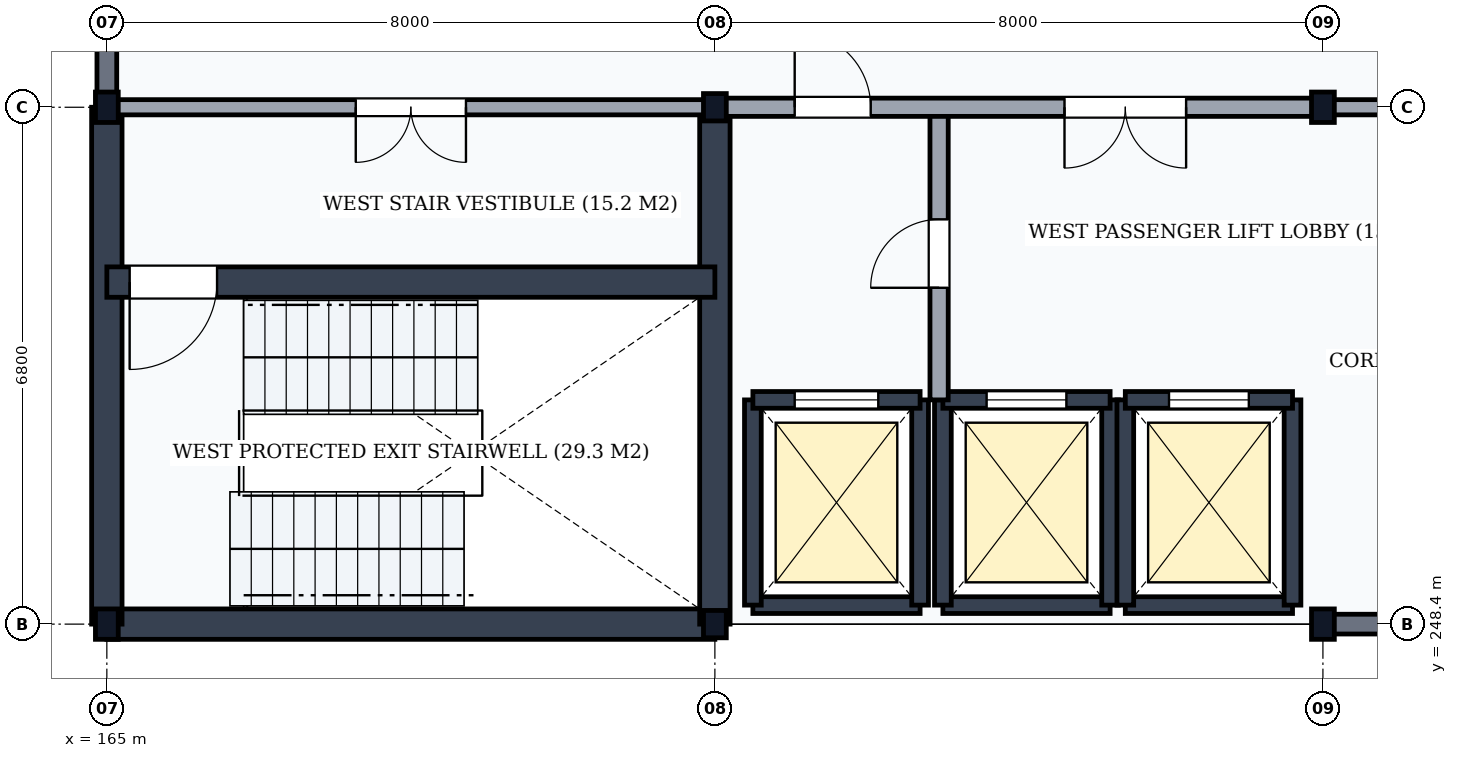
"""IFC4 building model, lengths in metres.
Left out: names, types, materials, properties, quantities, classifications, styles, units other than length and angle.
Written with IfcOpenShell. Run it as: python <this file> out.ifc"""

import sys

from ifc_helpers import new_model, si_unit, direction, frame, frame_2d, origin, origin_2d, place, context, subcontext, project, spatial, rectangle, i_section, extrude, element, fill, save


model = new_model("IFC4")
c1 = context("Model", 3, precision=1e-05, world=origin(), true_north=direction((0.0, 1.0)))
c2 = subcontext(c1, "Body", "Model", "MODEL_VIEW")
j1 = project(units=[si_unit("LENGTHUNIT", "METRE"), si_unit("PLANEANGLEUNIT", "RADIAN")], contexts=[c1])
p1 = place(None, origin())
s1 = spatial("IfcSite", under=j1, at=p1, CompositionType="ELEMENT")
p2 = place(p1, origin())
s2 = spatial("IfcBuilding", under=s1, at=p2, CompositionType="ELEMENT")
p3 = place(p2, frame((0.0, 0.0, 63.9)))
s3 = spatial("IfcBuildingStorey", under=s2, at=p3, CompositionType="ELEMENT", Elevation=63.9)
for number, where, z_axis, x_axis in (
    (1, (165.0, 248.4, 0.0), (0.0, 0.0, 1.0), (1.0, 0.0, 0.0)),
    (2, (165.0, 255.2, 0.0), (0.0, 0.0, 1.0), (1.0, 0.0, 0.0)),
):
    element("IfcColumn", number, at=place(p3, frame(where, z_axis=z_axis, x_axis=x_axis)), inside=s3, PredefinedType="COLUMN", context=c2, shape_type="SweptSolid", body=[
        extrude(i_section(OverallWidth=0.3, OverallDepth=0.4, WebThickness=0.013, FlangeThickness=0.024, FilletRadius=0.027, at=origin_2d()), origin(), (0.0, 0.0, 1.0), 3.9),
    ])
for number, where, z_axis, x_axis in (
    (3, (173.0, 248.4, 0.0), (0.0, 0.0, 1.0), (1.0, 0.0, 0.0)),
    (4, (173.0, 255.2, 0.0), (0.0, 0.0, 1.0), (1.0, 0.0, 0.0)),
):
    element("IfcColumn", number, at=place(p3, frame(where, z_axis=z_axis, x_axis=x_axis)), inside=s3, PredefinedType="COLUMN", context=c2, shape_type="SweptSolid", body=[
        extrude(i_section(OverallWidth=0.3, OverallDepth=0.36, WebThickness=0.012, FlangeThickness=0.022, FilletRadius=0.027, at=origin_2d()), origin(), (0.0, 0.0, 1.0), 3.9),
    ])
for number, where, z_axis, x_axis in (
    (5, (181.0, 248.4, 0.0), (0.0, 0.0, 1.0), (1.0, 0.0, 0.0)),
    (6, (181.0, 255.2, 0.0), (0.0, 0.0, 1.0), (1.0, 0.0, 0.0)),
):
    element("IfcColumn", number, at=place(p3, frame(where, z_axis=z_axis, x_axis=x_axis)), inside=s3, PredefinedType="COLUMN", context=c2, shape_type="SweptSolid", body=[
        extrude(i_section(OverallWidth=0.3, OverallDepth=0.4, WebThickness=0.013, FlangeThickness=0.024, FilletRadius=0.027, at=origin_2d()), origin(), (0.0, 0.0, 1.0), 3.9),
    ])
p4 = place(p3, frame((181.006, 248.4, 0.0), z_axis=(0.0, 0.0, 1.0), x_axis=(1.0, 0.0, 0.0)))
e7 = element("IfcWall", 7, at=p4, inside=s3, PredefinedType="SOLIDWALL", context=c2, shape_type="SweptSolid", body=[
    extrude(rectangle(XDim=7.988, YDim=0.26, at=frame_2d((3.994, 0.0))), origin(), (0.0, 0.0, 1.0), 3.388),
])
p5 = place(p4, frame((3.244, 0.0, 0.95)))
e8 = element("IfcOpeningElement", 8, at=p5, cuts=e7, PredefinedType="OPENING", context=c2, shape_type="SweptSolid", body=[
    extrude(rectangle(XDim=0.9, YDim=2.2, at=frame_2d((0.45, 1.1))), frame((0.0, 0.145, 0.0), z_axis=(0.0, -1.0, 0.0), x_axis=(1.0, 0.0, 0.0)), (0.0, 0.0, 1.0), 0.29),
])
p6 = place(p3, frame((165.0, 255.206, 0.0), z_axis=(0.0, 0.0, 1.0), x_axis=(0.0, 1.0, 0.0)))
e9 = element("IfcWall", 9, at=p6, inside=s3, PredefinedType="SOLIDWALL", context=c2, shape_type="SweptSolid", body=[
    extrude(rectangle(XDim=7.588, YDim=0.26, at=frame_2d((3.794, 0.0))), origin(), (0.0, 0.0, 1.0), 3.428),
])
p7 = place(p3, frame((165.0, 248.4, 0.0), z_axis=(0.0, 0.0, 1.0), x_axis=(1.0, 0.0, 0.0)))
e10 = element("IfcWall", 10, at=p7, inside=s3, PredefinedType="SHEAR", context=c2, shape_type="SweptSolid", body=[
    extrude(rectangle(XDim=8.0, YDim=0.4, at=frame_2d((4.0, 0.0))), origin(), (0.0, 0.0, 1.0), 3.7),
])
for number, where, z_axis, x_axis in (
    (11, (165.0, 248.4, 0.0), (0.0, 0.0, 1.0), (0.0, 1.0, 0.0)),
    (12, (173.0, 248.4, 0.0), (0.0, 0.0, 1.0), (0.0, 1.0, 0.0)),
):
    element("IfcWall", number, at=place(p3, frame(where, z_axis=z_axis, x_axis=x_axis)), inside=s3, PredefinedType="SHEAR", context=c2, shape_type="SweptSolid", body=[
        extrude(rectangle(XDim=6.8, YDim=0.4, at=frame_2d((3.4, 0.0))), origin(), (0.0, 0.0, 1.0), 3.7),
    ])
p8 = place(p3, frame((165.0, 252.9, 0.0), z_axis=(0.0, 0.0, 1.0), x_axis=(1.0, 0.0, 0.0)))
e13 = element("IfcWall", 13, at=p8, inside=s3, PredefinedType="SHEAR", context=c2, shape_type="SweptSolid", body=[
    extrude(rectangle(XDim=8.0, YDim=0.4, at=frame_2d((4.0, 0.0))), origin(), (0.0, 0.0, 1.0), 3.7),
])
p9 = place(p8, frame((0.3, 0.0, 0.0)))
e14 = element("IfcOpeningElement", 14, at=p9, cuts=e13, PredefinedType="OPENING", context=c2, shape_type="SweptSolid", body=[
    extrude(rectangle(XDim=1.15, YDim=2.15, at=frame_2d((0.575, 1.075))), frame((0.0, 0.215, 0.0), z_axis=(0.0, -1.0, 0.0), x_axis=(1.0, 0.0, 0.0)), (0.0, 0.0, 1.0), 0.43),
])
p10 = place(p3, frame((165.0, 255.2, 0.0), z_axis=(0.0, 0.0, 1.0), x_axis=(1.0, 0.0, 0.0)))
e15 = element("IfcWall", 15, at=p10, inside=s3, PredefinedType="PARTITIONING", context=c2, shape_type="SweptSolid", body=[
    extrude(rectangle(XDim=8.0, YDim=0.2, at=frame_2d((4.0, 0.0))), origin(), (0.0, 0.0, 1.0), 3.148),
])
p11 = place(p10, frame((3.275, 0.0, 0.0)))
e16 = element("IfcOpeningElement", 16, at=p11, cuts=e15, PredefinedType="OPENING", context=c2, shape_type="SweptSolid", body=[
    extrude(rectangle(XDim=1.45, YDim=2.2, at=frame_2d((0.725, 1.1))), frame((0.0, 0.115, 0.0), z_axis=(0.0, -1.0, 0.0), x_axis=(1.0, 0.0, 0.0)), (0.0, 0.0, 1.0), 0.23),
])
p12 = place(p3, frame((173.5, 248.65, 0.0), z_axis=(0.0, 0.0, 1.0), x_axis=(1.0, 0.0, 0.0)))
e17 = element("IfcWall", 17, at=p12, inside=s3, PredefinedType="SHEAR", context=c2, shape_type="SweptSolid", body=[
    extrude(rectangle(XDim=2.2, YDim=0.22, at=frame_2d((1.1, 0.0))), origin(), (0.0, 0.0, 1.0), 3.7),
])
for number, where, z_axis, x_axis in (
    (18, (173.5, 248.65, 0.0), (0.0, 0.0, 1.0), (0.0, 1.0, 0.0)),
    (19, (175.7, 248.65, 0.0), (0.0, 0.0, 1.0), (0.0, 1.0, 0.0)),
):
    element("IfcWall", number, at=place(p3, frame(where, z_axis=z_axis, x_axis=x_axis)), inside=s3, PredefinedType="SHEAR", context=c2, shape_type="SweptSolid", body=[
        extrude(rectangle(XDim=2.7, YDim=0.22, at=frame_2d((1.35, 0.0))), origin(), (0.0, 0.0, 1.0), 3.7),
    ])
p13 = place(p3, frame((173.5, 251.35, 0.0), z_axis=(0.0, 0.0, 1.0), x_axis=(1.0, 0.0, 0.0)))
e20 = element("IfcWall", 20, at=p13, inside=s3, PredefinedType="SHEAR", context=c2, shape_type="SweptSolid", body=[
    extrude(rectangle(XDim=2.2, YDim=0.22, at=frame_2d((1.1, 0.0))), origin(), (0.0, 0.0, 1.0), 3.7),
])
p14 = place(p13, frame((0.55, 0.0, 0.0)))
e21 = element("IfcOpeningElement", 21, at=p14, cuts=e20, PredefinedType="OPENING", context=c2, shape_type="SweptSolid", body=[
    extrude(rectangle(XDim=1.1, YDim=2.15, at=frame_2d((0.55, 1.075))), frame((0.0, 0.125, 0.0), z_axis=(0.0, -1.0, 0.0), x_axis=(1.0, 0.0, 0.0)), (0.0, 0.0, 1.0), 0.25),
])
p15 = place(p3, frame((176.0, 248.65, 0.0), z_axis=(0.0, 0.0, 1.0), x_axis=(1.0, 0.0, 0.0)))
e22 = element("IfcWall", 22, at=p15, inside=s3, PredefinedType="SHEAR", context=c2, shape_type="SweptSolid", body=[
    extrude(rectangle(XDim=2.2, YDim=0.22, at=frame_2d((1.1, 0.0))), origin(), (0.0, 0.0, 1.0), 3.7),
])
for number, where, z_axis, x_axis in (
    (23, (176.0, 248.65, 0.0), (0.0, 0.0, 1.0), (0.0, 1.0, 0.0)),
    (24, (178.2, 248.65, 0.0), (0.0, 0.0, 1.0), (0.0, 1.0, 0.0)),
):
    element("IfcWall", number, at=place(p3, frame(where, z_axis=z_axis, x_axis=x_axis)), inside=s3, PredefinedType="SHEAR", context=c2, shape_type="SweptSolid", body=[
        extrude(rectangle(XDim=2.7, YDim=0.22, at=frame_2d((1.35, 0.0))), origin(), (0.0, 0.0, 1.0), 3.7),
    ])
p16 = place(p3, frame((176.0, 251.35, 0.0), z_axis=(0.0, 0.0, 1.0), x_axis=(1.0, 0.0, 0.0)))
e25 = element("IfcWall", 25, at=p16, inside=s3, PredefinedType="SHEAR", context=c2, shape_type="SweptSolid", body=[
    extrude(rectangle(XDim=2.2, YDim=0.22, at=frame_2d((1.1, 0.0))), origin(), (0.0, 0.0, 1.0), 3.7),
])
p17 = place(p16, frame((0.575, 0.0, 0.0)))
e26 = element("IfcOpeningElement", 26, at=p17, cuts=e25, PredefinedType="OPENING", context=c2, shape_type="SweptSolid", body=[
    extrude(rectangle(XDim=1.05, YDim=2.15, at=frame_2d((0.525, 1.075))), frame((0.0, 0.125, 0.0), z_axis=(0.0, -1.0, 0.0), x_axis=(1.0, 0.0, 0.0)), (0.0, 0.0, 1.0), 0.25),
])
p18 = place(p3, frame((178.4, 248.65, 0.0), z_axis=(0.0, 0.0, 1.0), x_axis=(1.0, 0.0, 0.0)))
e27 = element("IfcWall", 27, at=p18, inside=s3, PredefinedType="SHEAR", context=c2, shape_type="SweptSolid", body=[
    extrude(rectangle(XDim=2.2, YDim=0.22, at=frame_2d((1.1, 0.0))), origin(), (0.0, 0.0, 1.0), 3.7),
])
for number, where, z_axis, x_axis in (
    (28, (178.4, 248.65, 0.0), (0.0, 0.0, 1.0), (0.0, 1.0, 0.0)),
    (29, (180.6, 248.65, 0.0), (0.0, 0.0, 1.0), (0.0, 1.0, 0.0)),
):
    element("IfcWall", number, at=place(p3, frame(where, z_axis=z_axis, x_axis=x_axis)), inside=s3, PredefinedType="SHEAR", context=c2, shape_type="SweptSolid", body=[
        extrude(rectangle(XDim=2.7, YDim=0.22, at=frame_2d((1.35, 0.0))), origin(), (0.0, 0.0, 1.0), 3.7),
    ])
p19 = place(p3, frame((178.4, 251.35, 0.0), z_axis=(0.0, 0.0, 1.0), x_axis=(1.0, 0.0, 0.0)))
e30 = element("IfcWall", 30, at=p19, inside=s3, PredefinedType="SHEAR", context=c2, shape_type="SweptSolid", body=[
    extrude(rectangle(XDim=2.2, YDim=0.22, at=frame_2d((1.1, 0.0))), origin(), (0.0, 0.0, 1.0), 3.7),
])
p20 = place(p19, frame((0.575, 0.0, 0.0)))
e31 = element("IfcOpeningElement", 31, at=p20, cuts=e30, PredefinedType="OPENING", context=c2, shape_type="SweptSolid", body=[
    extrude(rectangle(XDim=1.05, YDim=2.15, at=frame_2d((0.525, 1.075))), frame((0.0, 0.125, 0.0), z_axis=(0.0, -1.0, 0.0), x_axis=(1.0, 0.0, 0.0)), (0.0, 0.0, 1.0), 0.25),
])
p21 = place(p3, frame((175.95, 251.35, 0.0), z_axis=(0.0, 0.0, 1.0), x_axis=(0.0, 1.0, 0.0)))
e32 = element("IfcWall", 32, at=p21, inside=s3, PredefinedType="PARTITIONING", context=c2, shape_type="SweptSolid", body=[
    extrude(rectangle(XDim=3.85, YDim=0.24, at=frame_2d((1.925, 0.0))), origin(), (0.0, 0.0, 1.0), 3.7),
])
p22 = place(p21, frame((1.475, 0.0, 0.0)))
e33 = element("IfcOpeningElement", 33, at=p22, cuts=e32, PredefinedType="OPENING", context=c2, shape_type="SweptSolid", body=[
    extrude(rectangle(XDim=0.9, YDim=2.1, at=frame_2d((0.45, 1.05))), frame((0.0, 0.135, 0.0), z_axis=(0.0, -1.0, 0.0), x_axis=(1.0, 0.0, 0.0)), (0.0, 0.0, 1.0), 0.27),
])
p23 = place(p3, frame((173.0, 255.2, 0.0), z_axis=(0.0, 0.0, 1.0), x_axis=(1.0, 0.0, 0.0)))
e34 = element("IfcWall", 34, at=p23, inside=s3, PredefinedType="PARTITIONING", context=c2, shape_type="SweptSolid", body=[
    extrude(rectangle(XDim=8.0, YDim=0.24, at=frame_2d((4.0, 0.0))), origin(), (0.0, 0.0, 1.0), 3.148),
])
p24 = place(p23, frame((1.05, 0.0, 0.0)))
e35 = element("IfcOpeningElement", 35, at=p24, cuts=e34, PredefinedType="OPENING", context=c2, shape_type="SweptSolid", body=[
    extrude(rectangle(XDim=1.0, YDim=2.1, at=frame_2d((0.5, 1.05))), frame((0.0, 0.135, 0.0), z_axis=(0.0, -1.0, 0.0), x_axis=(1.0, 0.0, 0.0)), (0.0, 0.0, 1.0), 0.27),
])
p25 = place(p23, frame((4.6, 0.0, 0.0)))
e36 = element("IfcOpeningElement", 36, at=p25, cuts=e34, PredefinedType="OPENING", context=c2, shape_type="SweptSolid", body=[
    extrude(rectangle(XDim=1.6, YDim=2.25, at=frame_2d((0.8, 1.125))), frame((0.0, 0.135, 0.0), z_axis=(0.0, -1.0, 0.0), x_axis=(1.0, 0.0, 0.0)), (0.0, 0.0, 1.0), 0.27),
])
p26 = place(p3, frame((181.0, 255.2, 0.0), z_axis=(0.0, 0.0, 1.0), x_axis=(1.0, 0.0, 0.0)))
e37 = element("IfcWall", 37, at=p26, inside=s3, PredefinedType="PARTITIONING", context=c2, shape_type="SweptSolid", body=[
    extrude(rectangle(XDim=8.0, YDim=0.2, at=frame_2d((4.0, 0.0))), origin(), (0.0, 0.0, 1.0), 3.148),
])
p27 = place(p26, frame((0.85, 0.0, 0.0)))
e38 = element("IfcOpeningElement", 38, at=p27, cuts=e37, PredefinedType="OPENING", context=c2, shape_type="SweptSolid", body=[
    extrude(rectangle(XDim=0.9, YDim=2.1, at=frame_2d((0.45, 1.05))), frame((0.0, 0.115, 0.0), z_axis=(0.0, -1.0, 0.0), x_axis=(1.0, 0.0, 0.0)), (0.0, 0.0, 1.0), 0.23),
])
p28 = place(p26, frame((3.25, 0.0, 0.0)))
e39 = element("IfcOpeningElement", 39, at=p28, cuts=e37, PredefinedType="OPENING", context=c2, shape_type="SweptSolid", body=[
    extrude(rectangle(XDim=0.9, YDim=2.1, at=frame_2d((0.45, 1.05))), frame((0.0, 0.115, 0.0), z_axis=(0.0, -1.0, 0.0), x_axis=(1.0, 0.0, 0.0)), (0.0, 0.0, 1.0), 0.23),
])
p29 = place(p26, frame((5.075, 0.0, 0.0)))
e40 = element("IfcOpeningElement", 40, at=p29, cuts=e37, PredefinedType="OPENING", context=c2, shape_type="SweptSolid", body=[
    extrude(rectangle(XDim=0.95, YDim=2.1, at=frame_2d((0.475, 1.05))), frame((0.0, 0.115, 0.0), z_axis=(0.0, -1.0, 0.0), x_axis=(1.0, 0.0, 0.0)), (0.0, 0.0, 1.0), 0.23),
])
p30 = place(p26, frame((6.5, 0.0, 0.0)))
e41 = element("IfcOpeningElement", 41, at=p30, cuts=e37, PredefinedType="OPENING", context=c2, shape_type="SweptSolid", body=[
    extrude(rectangle(XDim=0.85, YDim=2.1, at=frame_2d((0.425, 1.05))), frame((0.0, 0.115, 0.0), z_axis=(0.0, -1.0, 0.0), x_axis=(1.0, 0.0, 0.0)), (0.0, 0.0, 1.0), 0.23),
])
p31 = place(p9, frame((1.15, 0.0, 0.0), z_axis=(0.0, 0.0, 1.0), x_axis=(-1.0, 0.0, 0.0)))
e42 = element("IfcDoor", 42, at=p31, inside=s3, OperationType="SINGLE_SWING_RIGHT", PredefinedType="DOOR", context=c2, shape_type="SweptSolid", body=[
    extrude(rectangle(XDim=1.15, YDim=2.15, at=frame_2d((0.575, 1.075))), frame((0.0, 0.025, 0.0), z_axis=(0.0, -1.0, 0.0), x_axis=(1.0, 0.0, 0.0)), (0.0, 0.0, 1.0), 0.05),
])
fill(e14, e42)
p32 = place(p11, frame((1.45, 0.0, 0.0), z_axis=(0.0, 0.0, 1.0), x_axis=(-1.0, 0.0, 0.0)))
e43 = element("IfcDoor", 43, at=p32, inside=s3, OperationType="DOUBLE_DOOR_SINGLE_SWING", PredefinedType="DOOR", context=c2, shape_type="SweptSolid", body=[
    extrude(rectangle(XDim=1.45, YDim=2.2, at=frame_2d((0.725, 1.1))), frame((0.0, 0.025, 0.0), z_axis=(0.0, -1.0, 0.0), x_axis=(1.0, 0.0, 0.0)), (0.0, 0.0, 1.0), 0.05),
])
fill(e16, e43)
p33 = place(p14, origin())
e44 = element("IfcDoor", 44, at=p33, inside=s3, OperationType="DOUBLE_DOOR_SLIDING", PredefinedType="USERDEFINED", context=c2, shape_type="SweptSolid", body=[
    extrude(rectangle(XDim=1.1, YDim=2.15, at=frame_2d((0.55, 1.075))), frame((0.0, 0.025, 0.0), z_axis=(0.0, -1.0, 0.0), x_axis=(1.0, 0.0, 0.0)), (0.0, 0.0, 1.0), 0.05),
])
fill(e21, e44)
p34 = place(p17, origin())
e45 = element("IfcDoor", 45, at=p34, inside=s3, OperationType="DOUBLE_DOOR_SLIDING", PredefinedType="USERDEFINED", context=c2, shape_type="SweptSolid", body=[
    extrude(rectangle(XDim=1.05, YDim=2.15, at=frame_2d((0.525, 1.075))), frame((0.0, 0.025, 0.0), z_axis=(0.0, -1.0, 0.0), x_axis=(1.0, 0.0, 0.0)), (0.0, 0.0, 1.0), 0.05),
])
fill(e26, e45)
p35 = place(p20, origin())
e46 = element("IfcDoor", 46, at=p35, inside=s3, OperationType="DOUBLE_DOOR_SLIDING", PredefinedType="USERDEFINED", context=c2, shape_type="SweptSolid", body=[
    extrude(rectangle(XDim=1.05, YDim=2.15, at=frame_2d((0.525, 1.075))), frame((0.0, 0.025, 0.0), z_axis=(0.0, -1.0, 0.0), x_axis=(1.0, 0.0, 0.0)), (0.0, 0.0, 1.0), 0.05),
])
fill(e31, e46)
p36 = place(p22, origin())
e47 = element("IfcDoor", 47, at=p36, inside=s3, OperationType="SINGLE_SWING_LEFT", PredefinedType="DOOR", context=c2, shape_type="SweptSolid", body=[
    extrude(rectangle(XDim=0.9, YDim=2.1, at=frame_2d((0.45, 1.05))), frame((0.0, 0.025, 0.0), z_axis=(0.0, -1.0, 0.0), x_axis=(1.0, 0.0, 0.0)), (0.0, 0.0, 1.0), 0.05),
])
fill(e33, e47)
p37 = place(p24, origin())
e48 = element("IfcDoor", 48, at=p37, inside=s3, OperationType="SINGLE_SWING_LEFT", PredefinedType="DOOR", context=c2, shape_type="SweptSolid", body=[
    extrude(rectangle(XDim=1.0, YDim=2.1, at=frame_2d((0.5, 1.05))), frame((0.0, 0.025, 0.0), z_axis=(0.0, -1.0, 0.0), x_axis=(1.0, 0.0, 0.0)), (0.0, 0.0, 1.0), 0.05),
])
fill(e35, e48)
p38 = place(p25, frame((1.6, 0.0, 0.0), z_axis=(0.0, 0.0, 1.0), x_axis=(-1.0, 0.0, 0.0)))
e49 = element("IfcDoor", 49, at=p38, inside=s3, OperationType="DOUBLE_DOOR_SINGLE_SWING", PredefinedType="DOOR", context=c2, shape_type="SweptSolid", body=[
    extrude(rectangle(XDim=1.6, YDim=2.25, at=frame_2d((0.8, 1.125))), frame((0.0, 0.025, 0.0), z_axis=(0.0, -1.0, 0.0), x_axis=(1.0, 0.0, 0.0)), (0.0, 0.0, 1.0), 0.05),
])
fill(e36, e49)
save(model, sys.argv[1])
